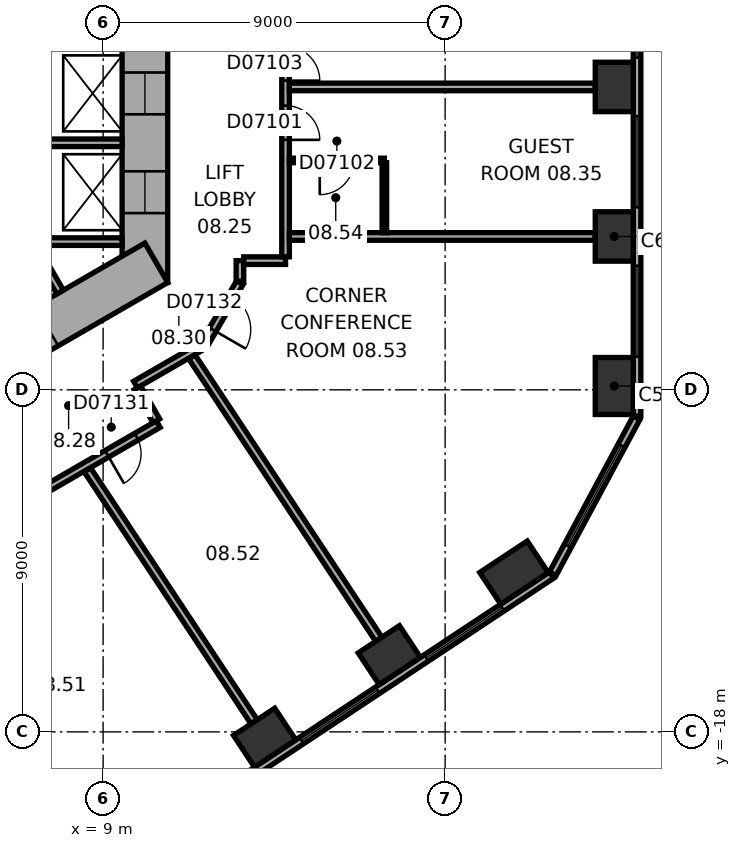
"""IFC4 building model, lengths in metres.
Left out: names, types, materials, properties, quantities, classifications, styles, units other than length and angle.
Written with IfcOpenShell. Run it as: python <this file> out.ifc"""

import sys

from ifc_helpers import new_model, si_unit, direction, frame, frame_2d, origin, origin_2d, place, context, subcontext, project, spatial, rectangle, extrude, element, fill, save


model = new_model("IFC4")
c1 = context("Model", 3, precision=1e-05, world=origin(), true_north=direction((0.0, 1.0)))
c2 = subcontext(c1, "Body", "Model", "MODEL_VIEW")
j1 = project(units=[si_unit("LENGTHUNIT", "METRE"), si_unit("PLANEANGLEUNIT", "RADIAN")], contexts=[c1])
p1 = place(None, origin())
s1 = spatial("IfcSite", under=j1, at=p1, CompositionType="ELEMENT")
p2 = place(p1, origin())
s2 = spatial("IfcBuilding", under=s1, at=p2, CompositionType="ELEMENT")
p3 = place(p2, frame((0.0, 0.0, 47.3)))
s3 = spatial("IfcBuildingStorey", under=s2, at=p3, CompositionType="ELEMENT", Elevation=47.3)
p4 = place(p3, frame((22.45, -8.899, 0.0), z_axis=(0.0, 0.0, 1.0), x_axis=(0.0, 1.0, 0.0)))
e1 = element("IfcColumn", 1, at=p4, inside=s3, PredefinedType="COLUMN", context=c2, shape_type="SweptSolid", body=[
    extrude(rectangle(XDim=1.5, YDim=1.0, at=origin_2d()), origin(), (0.0, 0.0, 1.0), 3.3),
])
for number, where, z_axis, x_axis in (
    (2, (22.45, -4.965, 0.0), (0.0, 0.0, 1.0), (0.0, 1.0, 0.0)),
    (3, (22.45, -1.03, 0.0), (0.0, 0.0, 1.0), (0.0, 1.0, 0.0)),
    (4, (13.25, -18.152, 0.0), (0.0, 0.0, 1.0), (0.834, 0.552, 0.0)),
    (5, (16.531, -15.981, 0.0), (0.0, 0.0, 1.0), (0.834, 0.552, 0.0)),
):
    element("IfcColumn", number, at=place(p3, frame(where, z_axis=z_axis, x_axis=x_axis)), inside=s3, PredefinedType="COLUMN", context=c2, shape_type="SweptSolid", body=[
        extrude(rectangle(XDim=1.3, YDim=1.0, at=origin_2d()), origin(), (0.0, 0.0, 1.0), 3.3),
    ])
p5 = place(p3, frame((19.812, -13.809, 0.0), z_axis=(0.0, 0.0, 1.0), x_axis=(0.833885822067, 0.551936985312, 0.0)))
e6 = element("IfcColumn", 6, at=p5, inside=s3, PredefinedType="COLUMN", context=c2, shape_type="SweptSolid", body=[
    extrude(rectangle(XDim=1.5, YDim=1.0, at=origin_2d()), origin(), (0.0, 0.0, 1.0), 3.3),
])
p6 = place(p3, frame((10.1, -6.177, 0.0), z_axis=(0.0, 0.0, 1.0), x_axis=(0.0, 1.0, 0.0)))
e7 = element("IfcWall", 7, at=p6, inside=s3, PredefinedType="SHEAR", context=c2, shape_type="SweptSolid", body=[
    extrude(rectangle(XDim=12.355, YDim=1.2, at=frame_2d((6.177, 0.0))), origin(), (0.0, 0.0, 1.0), 3.3),
])
p7 = place(p6, frame((6.378, 0.0, 0.0)))
e8 = element("IfcOpeningElement", 8, at=p7, cuts=e7, PredefinedType="OPENING", context=c2, shape_type="SweptSolid", body=[
    extrude(rectangle(XDim=1.5, YDim=2.1, at=frame_2d((0.75, 1.05))), frame((0.0, 0.61, 0.0), z_axis=(0.0, -1.0, 0.0), x_axis=(1.0, 0.0, 0.0)), (0.0, 0.0, 1.0), 1.22),
])
p8 = place(p6, frame((1.828, 0.0, 0.0)))
e9 = element("IfcOpeningElement", 9, at=p8, cuts=e7, PredefinedType="OPENING", context=c2, shape_type="SweptSolid", body=[
    extrude(rectangle(XDim=1.1, YDim=2.1, at=frame_2d((0.55, 1.05))), frame((0.0, 0.61, 0.0), z_axis=(0.0, -1.0, 0.0), x_axis=(1.0, 0.0, 0.0)), (0.0, 0.0, 1.0), 1.22),
])
p9 = place(p6, frame((4.427, 0.0, 0.0)))
e10 = element("IfcOpeningElement", 10, at=p9, cuts=e7, PredefinedType="OPENING", context=c2, shape_type="SweptSolid", body=[
    extrude(rectangle(XDim=1.1, YDim=2.1, at=frame_2d((0.55, 1.05))), frame((0.0, 0.61, 0.0), z_axis=(0.0, -1.0, 0.0), x_axis=(1.0, 0.0, 0.0)), (0.0, 0.0, 1.0), 1.22),
])
p10 = place(p3, frame((-0.3, -11.836, 0.0), z_axis=(0.0, 0.0, 1.0), x_axis=(0.866021384402, 0.500006961711, 0.0)))
e11 = element("IfcWall", 11, at=p10, inside=s3, PredefinedType="SHEAR", context=c2, shape_type="SweptSolid", body=[
    extrude(rectangle(XDim=12.355, YDim=1.2, at=frame_2d((6.178, 0.0))), origin(), (0.0, 0.0, 1.0), 3.3),
])
p11 = place(p10, frame((2.828, 0.0, 0.0)))
e12 = element("IfcOpeningElement", 12, at=p11, cuts=e11, PredefinedType="OPENING", context=c2, shape_type="SweptSolid", body=[
    extrude(rectangle(XDim=0.9, YDim=2.1, at=frame_2d((0.45, 1.05))), frame((0.0, 0.61, 0.0), z_axis=(0.0, -1.0, 0.0), x_axis=(1.0, 0.0, 0.0)), (0.0, 0.0, 1.0), 1.22),
])
p12 = place(p10, frame((5.428, 0.0, 0.0)))
e13 = element("IfcOpeningElement", 13, at=p12, cuts=e11, PredefinedType="OPENING", context=c2, shape_type="SweptSolid", body=[
    extrude(rectangle(XDim=0.9, YDim=2.1, at=frame_2d((0.45, 1.05))), frame((0.0, 0.61, 0.0), z_axis=(0.0, -1.0, 0.0), x_axis=(1.0, 0.0, 0.0)), (0.0, 0.0, 1.0), 1.22),
])
p13 = place(p10, frame((7.928, 0.0, 0.0)))
e14 = element("IfcOpeningElement", 14, at=p13, cuts=e11, PredefinedType="OPENING", context=c2, shape_type="SweptSolid", body=[
    extrude(rectangle(XDim=1.1, YDim=2.1, at=frame_2d((0.55, 1.05))), frame((0.0, 0.61, 0.0), z_axis=(0.0, -1.0, 0.0), x_axis=(1.0, 0.0, 0.0)), (0.0, 0.0, 1.0), 1.22),
])
p14 = place(p3, frame((23.05, -9.687, 0.0), z_axis=(0.0, 0.0, 1.0), x_axis=(0.0, 1.0, 0.0)))
e15 = element("IfcWall", 15, at=p14, inside=s3, PredefinedType="STANDARD", context=c2, shape_type="SweptSolid", body=[
    extrude(rectangle(XDim=21.246, YDim=0.2, at=frame_2d((10.623, 0.0))), origin(), (0.0, 0.0, 1.0), 3.3),
])
p15 = place(p14, frame((1.555, 0.0, 0.8)))
e16 = element("IfcOpeningElement", 16, at=p15, cuts=e15, PredefinedType="OPENING", context=c2, shape_type="SweptSolid", body=[
    extrude(rectangle(XDim=2.4, YDim=1.7, at=frame_2d((1.2, 0.85))), frame((0.0, 0.11, 0.0), z_axis=(0.0, -1.0, 0.0), x_axis=(1.0, 0.0, 0.0)), (0.0, 0.0, 1.0), 0.22),
])
p16 = place(p14, frame((5.489, 0.0, 0.8)))
e17 = element("IfcOpeningElement", 17, at=p16, cuts=e15, PredefinedType="OPENING", context=c2, shape_type="SweptSolid", body=[
    extrude(rectangle(XDim=2.4, YDim=1.7, at=frame_2d((1.2, 0.85))), frame((0.0, 0.11, 0.0), z_axis=(0.0, -1.0, 0.0), x_axis=(1.0, 0.0, 0.0)), (0.0, 0.0, 1.0), 0.22),
])
p17 = place(p14, frame((9.424, 0.0, 0.8)))
e18 = element("IfcOpeningElement", 18, at=p17, cuts=e15, PredefinedType="OPENING", context=c2, shape_type="SweptSolid", body=[
    extrude(rectangle(XDim=2.4, YDim=1.7, at=frame_2d((1.2, 0.85))), frame((0.0, 0.11, 0.0), z_axis=(0.0, -1.0, 0.0), x_axis=(1.0, 0.0, 0.0)), (0.0, 0.0, 1.0), 0.22),
])
p18 = place(p14, frame((13.358, 0.0, 0.8)))
e19 = element("IfcOpeningElement", 19, at=p18, cuts=e15, PredefinedType="OPENING", context=c2, shape_type="SweptSolid", body=[
    extrude(rectangle(XDim=2.4, YDim=1.7, at=frame_2d((1.2, 0.85))), frame((0.0, 0.11, 0.0), z_axis=(0.0, -1.0, 0.0), x_axis=(1.0, 0.0, 0.0)), (0.0, 0.0, 1.0), 0.22),
])
p19 = place(p14, frame((17.293, 0.0, 0.8)))
e20 = element("IfcOpeningElement", 20, at=p19, cuts=e15, PredefinedType="OPENING", context=c2, shape_type="SweptSolid", body=[
    extrude(rectangle(XDim=2.4, YDim=1.7, at=frame_2d((1.2, 0.85))), frame((0.0, 0.11, 0.0), z_axis=(0.0, -1.0, 0.0), x_axis=(1.0, 0.0, 0.0)), (0.0, 0.0, 1.0), 0.22),
])
p20 = place(p3, frame((3.083, -25.601, 0.0), z_axis=(0.0, 0.0, 1.0), x_axis=(0.833884295743, 0.551939291329, 0.0)))
e21 = element("IfcWall", 21, at=p20, inside=s3, PredefinedType="STANDARD", context=c2, shape_type="SweptSolid", body=[
    extrude(rectangle(XDim=21.246, YDim=0.2, at=frame_2d((10.623, 0.0))), origin(), (0.0, 0.0, 1.0), 3.3),
])
p21 = place(p20, frame((1.553, 0.0, 0.8)))
e22 = element("IfcOpeningElement", 22, at=p21, cuts=e21, PredefinedType="OPENING", context=c2, shape_type="SweptSolid", body=[
    extrude(rectangle(XDim=2.4, YDim=1.7, at=frame_2d((1.2, 0.85))), frame((0.0, 0.11, 0.0), z_axis=(0.0, -1.0, 0.0), x_axis=(1.0, 0.0, 0.0)), (0.0, 0.0, 1.0), 0.22),
])
p22 = place(p20, frame((5.488, 0.0, 0.8)))
e23 = element("IfcOpeningElement", 23, at=p22, cuts=e21, PredefinedType="OPENING", context=c2, shape_type="SweptSolid", body=[
    extrude(rectangle(XDim=2.4, YDim=1.7, at=frame_2d((1.2, 0.85))), frame((0.0, 0.11, 0.0), z_axis=(0.0, -1.0, 0.0), x_axis=(1.0, 0.0, 0.0)), (0.0, 0.0, 1.0), 0.22),
])
p23 = place(p20, frame((9.422, 0.0, 0.8)))
e24 = element("IfcOpeningElement", 24, at=p23, cuts=e21, PredefinedType="OPENING", context=c2, shape_type="SweptSolid", body=[
    extrude(rectangle(XDim=2.4, YDim=1.7, at=frame_2d((1.2, 0.85))), frame((0.0, 0.11, 0.0), z_axis=(0.0, -1.0, 0.0), x_axis=(1.0, 0.0, 0.0)), (0.0, 0.0, 1.0), 0.22),
])
p24 = place(p20, frame((13.357, 0.0, 0.8)))
e25 = element("IfcOpeningElement", 25, at=p24, cuts=e21, PredefinedType="OPENING", context=c2, shape_type="SweptSolid", body=[
    extrude(rectangle(XDim=2.4, YDim=1.7, at=frame_2d((1.2, 0.85))), frame((0.0, 0.11, 0.0), z_axis=(0.0, -1.0, 0.0), x_axis=(1.0, 0.0, 0.0)), (0.0, 0.0, 1.0), 0.22),
])
p25 = place(p20, frame((17.291, 0.0, 0.8)))
e26 = element("IfcOpeningElement", 26, at=p25, cuts=e21, PredefinedType="OPENING", context=c2, shape_type="SweptSolid", body=[
    extrude(rectangle(XDim=2.4, YDim=1.7, at=frame_2d((1.2, 0.85))), frame((0.0, 0.11, 0.0), z_axis=(0.0, -1.0, 0.0), x_axis=(1.0, 0.0, 0.0)), (0.0, 0.0, 1.0), 0.22),
])
p26 = place(p3, frame((20.833, -13.839, 0.0), z_axis=(0.0, 0.0, 1.0), x_axis=(0.473321668581, 0.880889662813, 0.0)))
e27 = element("IfcWall", 27, at=p26, inside=s3, PredefinedType="STANDARD", context=c2, shape_type="SweptSolid", body=[
    extrude(rectangle(XDim=4.66, YDim=0.2, at=frame_2d((2.33, 0.0))), origin(), (0.0, 0.0, 1.0), 3.3),
])
p27 = place(p26, frame((0.83, 0.0, 0.8)))
e28 = element("IfcOpeningElement", 28, at=p27, cuts=e27, PredefinedType="OPENING", context=c2, shape_type="SweptSolid", body=[
    extrude(rectangle(XDim=3.0, YDim=1.7, at=frame_2d((1.5, 0.85))), frame((0.0, 0.11, 0.0), z_axis=(0.0, -1.0, 0.0), x_axis=(1.0, 0.0, 0.0)), (0.0, 0.0, 1.0), 0.22),
])
for number, where, z_axis, x_axis in (
    (29, (7.3, -5.1, 0.0), (0.0, 0.0, 1.0), (1.0, 0.0, 0.0)),
    (30, (7.3, -2.5, 0.0), (0.0, 0.0, 1.0), (1.0, 0.0, 0.0)),
    (31, (6.768, -4.522, 0.0), (0.0, 0.0, 1.0), (0.5, -0.866, 0.0)),
):
    element("IfcWall", number, at=place(p3, frame(where, z_axis=z_axis, x_axis=x_axis)), inside=s3, PredefinedType="PARTITIONING", context=c2, shape_type="SweptSolid", body=[
        extrude(rectangle(XDim=2.2, YDim=0.2, at=frame_2d((1.1, 0.0))), origin(), (0.0, 0.0, 1.0), 3.05),
    ])
p28 = place(p3, frame((7.419, -11.653, 0.0), z_axis=(0.0, 0.0, 1.0), x_axis=(0.866038154057, 0.49997791523, 0.0)))
e32 = element("IfcWall", 32, at=p28, inside=s3, PredefinedType="PARTITIONING", context=c2, shape_type="SweptSolid", body=[
    extrude(rectangle(XDim=3.502, YDim=0.2, at=frame_2d((1.751, 0.0))), origin(), (0.0, 0.0, 1.0), 3.05),
])
p29 = place(p28, frame((1.94, 0.0, 0.0)))
e33 = element("IfcOpeningElement", 33, at=p29, cuts=e32, PredefinedType="OPENING", context=c2, shape_type="SweptSolid", body=[
    extrude(rectangle(XDim=0.9, YDim=2.1, at=frame_2d((0.45, 1.05))), frame((0.0, 0.11, 0.0), z_axis=(0.0, -1.0, 0.0), x_axis=(1.0, 0.0, 0.0)), (0.0, 0.0, 1.0), 0.22),
])
p30 = place(p3, frame((9.852, -8.861, 0.0), z_axis=(0.0, 0.0, 1.0), x_axis=(0.866013291437, 0.500020978615, 0.0)))
e34 = element("IfcWall", 34, at=p30, inside=s3, PredefinedType="PARTITIONING", context=c2, shape_type="SweptSolid", body=[
    extrude(rectangle(XDim=2.077, YDim=0.2, at=frame_2d((1.038, 0.0))), origin(), (0.0, 0.0, 1.0), 3.05),
])
p31 = place(p3, frame((10.402, -9.815, 0.0), z_axis=(0.0, 0.0, 1.0), x_axis=(-0.499968756647, 0.866043441391, 0.0)))
e35 = element("IfcWall", 35, at=p31, inside=s3, PredefinedType="PARTITIONING", context=c2, shape_type="SweptSolid", body=[
    extrude(rectangle(XDim=1.001, YDim=0.2, at=frame_2d((0.5, 0.0))), origin(), (0.0, 0.0, 1.0), 3.05),
])
p32 = place(p3, frame((11.67, -7.788, 0.0), z_axis=(0.0, 0.0, 1.0), x_axis=(0.500063286585, 0.865988862174, 0.0)))
e36 = element("IfcWall", 36, at=p32, inside=s3, PredefinedType="PARTITIONING", context=c2, shape_type="SweptSolid", body=[
    extrude(rectangle(XDim=1.86, YDim=0.2, at=frame_2d((0.93, 0.0))), origin(), (0.0, 0.0, 1.0), 3.05),
])
p33 = place(p32, frame((0.43, 0.0, 0.0)))
e37 = element("IfcOpeningElement", 37, at=p33, cuts=e36, PredefinedType="OPENING", context=c2, shape_type="SweptSolid", body=[
    extrude(rectangle(XDim=1.0, YDim=2.1, at=frame_2d((0.5, 1.05))), frame((0.0, 0.11, 0.0), z_axis=(0.0, -1.0, 0.0), x_axis=(1.0, 0.0, 0.0)), (0.0, 0.0, 1.0), 0.22),
])
p34 = place(p3, frame((12.6, -6.138, 0.0), z_axis=(0.0, 0.0, 1.0), x_axis=(0.0, 1.0, 0.0)))
e38 = element("IfcWall", 38, at=p34, inside=s3, PredefinedType="PARTITIONING", context=c2, shape_type="SweptSolid", body=[
    extrude(rectangle(XDim=0.537, YDim=0.2, at=frame_2d((0.268, 0.0))), origin(), (0.0, 0.0, 1.0), 3.05),
])
p35 = place(p3, frame((12.7, -5.601, 0.0), z_axis=(0.0, 0.0, 1.0), x_axis=(1.0, 0.0, 0.0)))
e39 = element("IfcWall", 39, at=p35, inside=s3, PredefinedType="PARTITIONING", context=c2, shape_type="SweptSolid", body=[
    extrude(rectangle(XDim=1.101, YDim=0.2, at=frame_2d((0.551, 0.0))), origin(), (0.0, 0.0, 1.0), 3.05),
])
p36 = place(p3, frame((12.974, -17.735, 0.0), z_axis=(0.0, 0.0, 1.0), x_axis=(-0.55192625685, 0.833892922982, 0.0)))
e40 = element("IfcWall", 40, at=p36, inside=s3, PredefinedType="PARTITIONING", context=c2, shape_type="SweptSolid", body=[
    extrude(rectangle(XDim=7.95, YDim=0.2, at=frame_2d((3.975, 0.0))), origin(), (0.0, 0.0, 1.0), 3.05),
])
p37 = place(p3, frame((13.801, -5.501, 0.0), z_axis=(0.0, 0.0, 1.0), x_axis=(0.0, 1.0, 0.0)))
e41 = element("IfcWall", 41, at=p37, inside=s3, PredefinedType="PARTITIONING", context=c2, shape_type="SweptSolid", body=[
    extrude(rectangle(XDim=5.702, YDim=0.2, at=frame_2d((2.851, 0.0))), origin(), (0.0, 0.0, 1.0), 3.05),
])
p38 = place(p37, frame((3.079, 0.0, 0.0)))
e42 = element("IfcOpeningElement", 42, at=p38, cuts=e41, PredefinedType="OPENING", context=c2, shape_type="SweptSolid", body=[
    extrude(rectangle(XDim=0.9, YDim=2.1, at=frame_2d((0.45, 1.05))), frame((0.0, 0.11, 0.0), z_axis=(0.0, -1.0, 0.0), x_axis=(1.0, 0.0, 0.0)), (0.0, 0.0, 1.0), 0.22),
])
p39 = place(p37, frame((4.636, 0.0, 0.0)))
e43 = element("IfcOpeningElement", 43, at=p39, cuts=e41, PredefinedType="OPENING", context=c2, shape_type="SweptSolid", body=[
    extrude(rectangle(XDim=0.9, YDim=2.1, at=frame_2d((0.45, 1.05))), frame((0.0, 0.11, 0.0), z_axis=(0.0, -1.0, 0.0), x_axis=(1.0, 0.0, 0.0)), (0.0, 0.0, 1.0), 0.22),
])
p40 = place(p3, frame((13.901, -4.965, 0.0), z_axis=(0.0, 0.0, 1.0), x_axis=(1.0, 0.0, 0.0)))
e44 = element("IfcWall", 44, at=p40, inside=s3, PredefinedType="PARTITIONING", context=c2, shape_type="SweptSolid", body=[
    extrude(rectangle(XDim=8.049, YDim=0.2, at=frame_2d((4.024, 0.0))), origin(), (0.0, 0.0, 1.0), 3.05),
])
p41 = place(p3, frame((13.901, -2.965, 0.0), z_axis=(0.0, 0.0, 1.0), x_axis=(1.0, 0.0, 0.0)))
e45 = element("IfcWall", 45, at=p41, inside=s3, PredefinedType="PARTITIONING", context=c2, shape_type="SweptSolid", body=[
    extrude(rectangle(XDim=2.5, YDim=0.12, at=frame_2d((1.25, 0.0))), origin(), (0.0, 0.0, 1.0), 3.05),
])
p42 = place(p41, frame((0.8, 0.0, 0.0)))
e46 = element("IfcOpeningElement", 46, at=p42, cuts=e45, PredefinedType="OPENING", context=c2, shape_type="SweptSolid", body=[
    extrude(rectangle(XDim=0.9, YDim=2.1, at=frame_2d((0.45, 1.05))), frame((0.0, 0.07, 0.0), z_axis=(0.0, -1.0, 0.0), x_axis=(1.0, 0.0, 0.0)), (0.0, 0.0, 1.0), 0.14),
])
p43 = place(p3, frame((16.255, -15.564, 0.0), z_axis=(0.0, 0.0, 1.0), x_axis=(-0.55192208744, 0.833895682562, 0.0)))
e47 = element("IfcWall", 47, at=p43, inside=s3, PredefinedType="PARTITIONING", context=c2, shape_type="SweptSolid", body=[
    extrude(rectangle(XDim=8.913, YDim=0.2, at=frame_2d((4.457, 0.0))), origin(), (0.0, 0.0, 1.0), 2.6),
])
p44 = place(p3, frame((16.401, -3.025, 0.0), z_axis=(0.0, 0.0, 1.0), x_axis=(0.0, -1.0, 0.0)))
e48 = element("IfcWall", 48, at=p44, inside=s3, PredefinedType="PARTITIONING", context=c2, shape_type="SweptSolid", body=[
    extrude(rectangle(XDim=1.84, YDim=0.12, at=frame_2d((0.92, 0.0))), origin(), (0.0, 0.0, 1.0), 3.05),
])
p45 = place(p3, frame((21.95, -1.03, 0.0), z_axis=(0.0, 0.0, 1.0), x_axis=(-1.0, 0.0, 0.0)))
e49 = element("IfcWall", 49, at=p45, inside=s3, PredefinedType="PARTITIONING", context=c2, shape_type="SweptSolid", body=[
    extrude(rectangle(XDim=8.049, YDim=0.2, at=frame_2d((4.024, 0.0))), origin(), (0.0, 0.0, 1.0), 2.6),
])
p46 = place(p15, origin())
e50 = element("IfcWindow", 50, at=p46, inside=s3, PartitioningType="SINGLE_PANEL", PredefinedType="WINDOW", context=c2, shape_type="SweptSolid", body=[
    extrude(rectangle(XDim=2.4, YDim=1.7, at=frame_2d((1.2, 0.85))), frame((0.0, 0.03, 0.0), z_axis=(0.0, -1.0, 0.0), x_axis=(1.0, 0.0, 0.0)), (0.0, 0.0, 1.0), 0.06),
])
fill(e16, e50)
p47 = place(p16, origin())
e51 = element("IfcWindow", 51, at=p47, inside=s3, PartitioningType="SINGLE_PANEL", PredefinedType="WINDOW", context=c2, shape_type="SweptSolid", body=[
    extrude(rectangle(XDim=2.4, YDim=1.7, at=frame_2d((1.2, 0.85))), frame((0.0, 0.03, 0.0), z_axis=(0.0, -1.0, 0.0), x_axis=(1.0, 0.0, 0.0)), (0.0, 0.0, 1.0), 0.06),
])
fill(e17, e51)
p48 = place(p17, origin())
e52 = element("IfcWindow", 52, at=p48, inside=s3, PartitioningType="SINGLE_PANEL", PredefinedType="WINDOW", context=c2, shape_type="SweptSolid", body=[
    extrude(rectangle(XDim=2.4, YDim=1.7, at=frame_2d((1.2, 0.85))), frame((0.0, 0.03, 0.0), z_axis=(0.0, -1.0, 0.0), x_axis=(1.0, 0.0, 0.0)), (0.0, 0.0, 1.0), 0.06),
])
fill(e18, e52)
p49 = place(p24, origin())
e53 = element("IfcWindow", 53, at=p49, inside=s3, PartitioningType="SINGLE_PANEL", PredefinedType="WINDOW", context=c2, shape_type="SweptSolid", body=[
    extrude(rectangle(XDim=2.4, YDim=1.7, at=frame_2d((1.2, 0.85))), frame((0.0, 0.03, 0.0), z_axis=(0.0, -1.0, 0.0), x_axis=(1.0, 0.0, 0.0)), (0.0, 0.0, 1.0), 0.06),
])
fill(e25, e53)
p50 = place(p25, origin())
e54 = element("IfcWindow", 54, at=p50, inside=s3, PartitioningType="SINGLE_PANEL", PredefinedType="WINDOW", context=c2, shape_type="SweptSolid", body=[
    extrude(rectangle(XDim=2.4, YDim=1.7, at=frame_2d((1.2, 0.85))), frame((0.0, 0.03, 0.0), z_axis=(0.0, -1.0, 0.0), x_axis=(1.0, 0.0, 0.0)), (0.0, 0.0, 1.0), 0.06),
])
fill(e26, e54)
p51 = place(p27, origin())
e55 = element("IfcWindow", 55, at=p51, inside=s3, PartitioningType="SINGLE_PANEL", PredefinedType="WINDOW", context=c2, shape_type="SweptSolid", body=[
    extrude(rectangle(XDim=3.0, YDim=1.7, at=frame_2d((1.5, 0.85))), frame((0.0, 0.03, 0.0), z_axis=(0.0, -1.0, 0.0), x_axis=(1.0, 0.0, 0.0)), (0.0, 0.0, 1.0), 0.06),
])
fill(e28, e55)
p52 = place(p8, origin())
e56 = element("IfcDoor", 56, at=p52, inside=s3, OperationType="DOUBLE_DOOR_SLIDING", PredefinedType="DOOR", context=c2, shape_type="SweptSolid", body=[
    extrude(rectangle(XDim=1.1, YDim=2.1, at=frame_2d((0.55, 1.05))), frame((0.0, 0.025, 0.0), z_axis=(0.0, -1.0, 0.0), x_axis=(1.0, 0.0, 0.0)), (0.0, 0.0, 1.0), 0.05),
])
fill(e9, e56)
p53 = place(p9, origin())
e57 = element("IfcDoor", 57, at=p53, inside=s3, OperationType="DOUBLE_DOOR_SLIDING", PredefinedType="DOOR", context=c2, shape_type="SweptSolid", body=[
    extrude(rectangle(XDim=1.1, YDim=2.1, at=frame_2d((0.55, 1.05))), frame((0.0, 0.025, 0.0), z_axis=(0.0, -1.0, 0.0), x_axis=(1.0, 0.0, 0.0)), (0.0, 0.0, 1.0), 0.05),
])
fill(e10, e57)
p54 = place(p38, origin())
e58 = element("IfcDoor", 58, at=p54, inside=s3, OperationType="SINGLE_SWING_LEFT", PredefinedType="DOOR", context=c2, shape_type="SweptSolid", body=[
    extrude(rectangle(XDim=0.9, YDim=2.1, at=frame_2d((0.45, 1.05))), frame((0.0, 0.025, 0.0), z_axis=(0.0, -1.0, 0.0), x_axis=(1.0, 0.0, 0.0)), (0.0, 0.0, 1.0), 0.05),
])
fill(e42, e58)
p55 = place(p42, origin())
e59 = element("IfcDoor", 59, at=p55, inside=s3, OperationType="SINGLE_SWING_LEFT", PredefinedType="DOOR", context=c2, shape_type="SweptSolid", body=[
    extrude(rectangle(XDim=0.9, YDim=2.1, at=frame_2d((0.45, 1.05))), frame((0.0, 0.025, 0.0), z_axis=(0.0, -1.0, 0.0), x_axis=(1.0, 0.0, 0.0)), (0.0, 0.0, 1.0), 0.05),
])
fill(e46, e59)
p56 = place(p39, origin())
e60 = element("IfcDoor", 60, at=p56, inside=s3, OperationType="SINGLE_SWING_LEFT", PredefinedType="DOOR", context=c2, shape_type="SweptSolid", body=[
    extrude(rectangle(XDim=0.9, YDim=2.1, at=frame_2d((0.45, 1.05))), frame((0.0, 0.025, 0.0), z_axis=(0.0, -1.0, 0.0), x_axis=(1.0, 0.0, 0.0)), (0.0, 0.0, 1.0), 0.05),
])
fill(e43, e60)
p57 = place(p29, origin())
e61 = element("IfcDoor", 61, at=p57, inside=s3, OperationType="SINGLE_SWING_LEFT", PredefinedType="DOOR", context=c2, shape_type="SweptSolid", body=[
    extrude(rectangle(XDim=0.9, YDim=2.1, at=frame_2d((0.45, 1.05))), frame((0.0, 0.025, 0.0), z_axis=(0.0, -1.0, 0.0), x_axis=(1.0, 0.0, 0.0)), (0.0, 0.0, 1.0), 0.05),
])
fill(e33, e61)
p58 = place(p33, origin())
e62 = element("IfcDoor", 62, at=p58, inside=s3, OperationType="SINGLE_SWING_LEFT", PredefinedType="DOOR", context=c2, shape_type="SweptSolid", body=[
    extrude(rectangle(XDim=1.0, YDim=2.1, at=frame_2d((0.5, 1.05))), frame((0.0, 0.025, 0.0), z_axis=(0.0, -1.0, 0.0), x_axis=(1.0, 0.0, 0.0)), (0.0, 0.0, 1.0), 0.05),
])
fill(e37, e62)
save(model, sys.argv[1])
